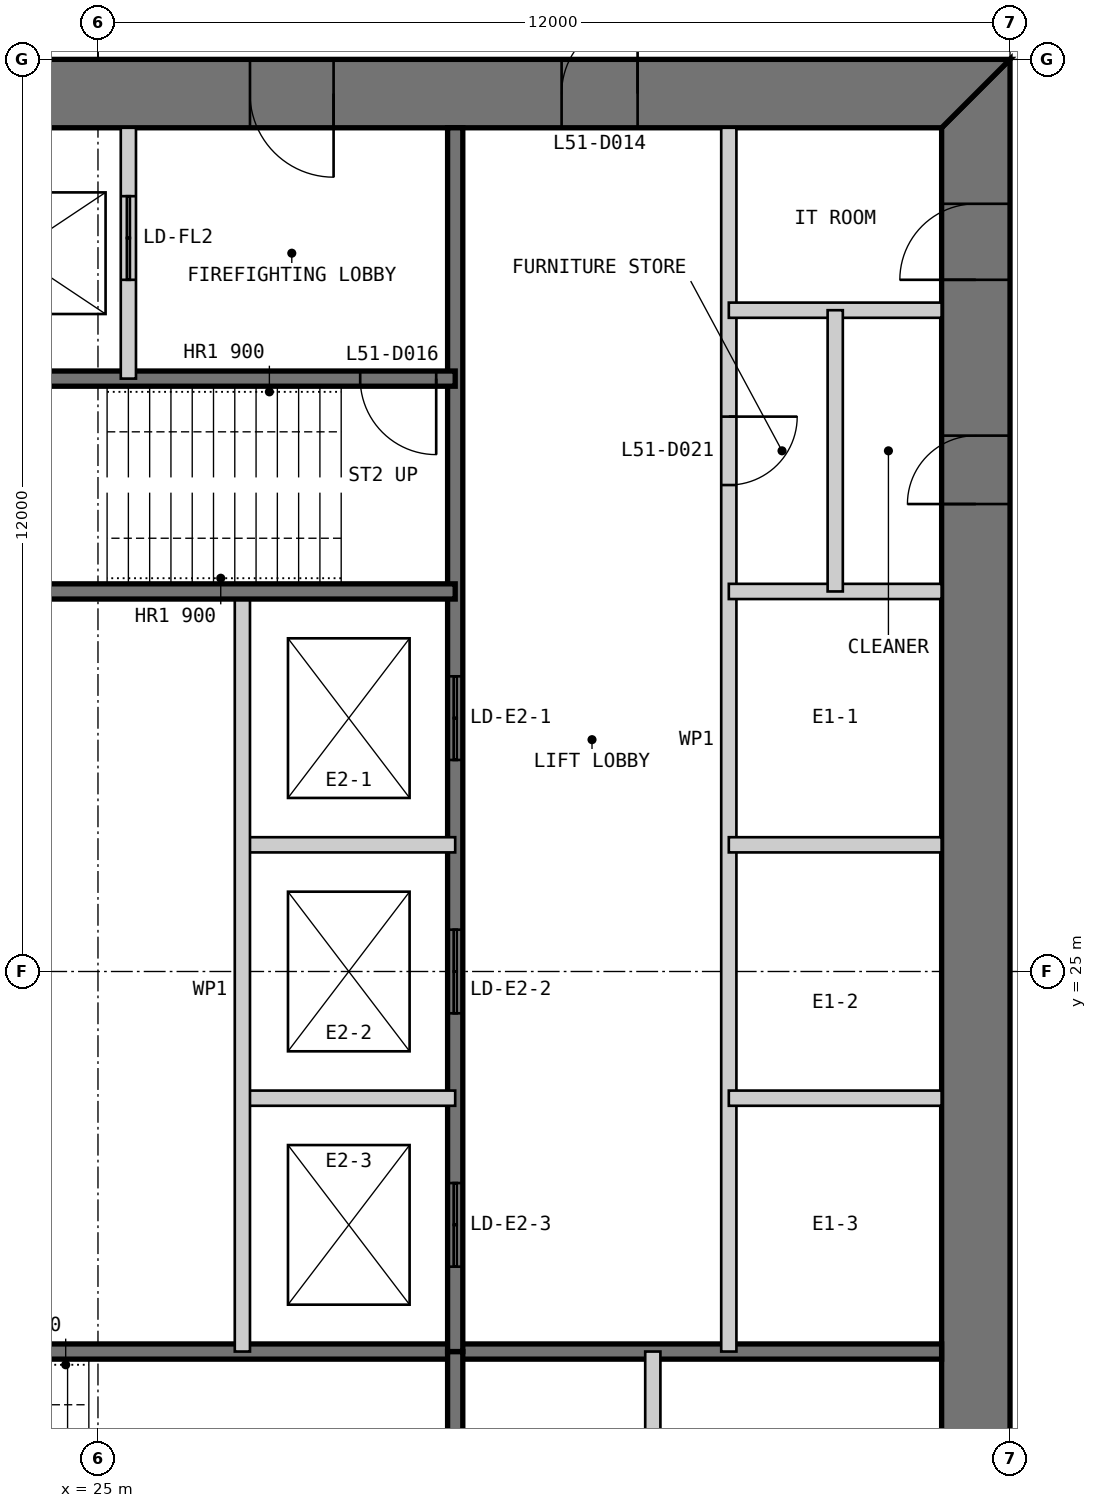
"""IFC4 building model, lengths in metres.
Left out: names, types, materials, properties, quantities, classifications, styles, units other than length and angle.
Written with IfcOpenShell. Run it as: python <this file> out.ifc"""

import sys

from ifc_helpers import new_model, si_unit, direction, frame, frame_2d, origin, place, context, subcontext, project, spatial, polyline, rectangle, outline, extrude, element, fill, save


model = new_model("IFC4")
c1 = context("Model", 3, precision=1e-05, world=origin(), true_north=direction((0.0, 1.0)))
c2 = subcontext(c1, "Body", "Model", "MODEL_VIEW")
j1 = project(units=[si_unit("LENGTHUNIT", "METRE"), si_unit("PLANEANGLEUNIT", "RADIAN")], contexts=[c1])
p1 = place(None, origin())
s1 = spatial("IfcSite", under=j1, at=p1, CompositionType="ELEMENT")
p2 = place(p1, origin())
s2 = spatial("IfcBuilding", under=s1, at=p2, CompositionType="ELEMENT")
p3 = place(p2, frame((0.0, 0.0, 217.8)))
s3 = spatial("IfcBuildingStorey", under=s2, at=p3, CompositionType="ELEMENT", Elevation=217.8)
p4 = place(p3, frame((36.55, 13.9, 0.0), z_axis=(0.0, 0.0, 1.0), x_axis=(0.0, 1.0, 0.0)))
e1 = element("IfcWall", 1, at=p4, inside=s3, PredefinedType="SHEAR", context=c2, shape_type="SweptSolid", body=[
    extrude(outline(polyline([(-0.9, -0.45), (23.1, -0.45), (22.2, 0.45), (0.0, 0.45), (-0.9, -0.45)])), origin(), (0.0, 0.0, 1.0), 4.0),
])
p5 = place(p4, frame((20.2, 0.0, 0.0)))
e2 = element("IfcOpeningElement", 2, at=p5, cuts=e1, PredefinedType="OPENING", context=c2, shape_type="SweptSolid", body=[
    extrude(rectangle(XDim=1.0, YDim=2.2, at=frame_2d((0.5, 1.1))), frame((0.0, 0.46, 0.0), z_axis=(0.0, -1.0, 0.0), x_axis=(1.0, 0.0, 0.0)), (0.0, 0.0, 1.0), 0.92),
])
p6 = place(p4, frame((17.25, 0.0, 0.0)))
e3 = element("IfcOpeningElement", 3, at=p6, cuts=e1, PredefinedType="OPENING", context=c2, shape_type="SweptSolid", body=[
    extrude(rectangle(XDim=0.9, YDim=2.2, at=frame_2d((0.45, 1.1))), frame((0.0, 0.46, 0.0), z_axis=(0.0, -1.0, 0.0), x_axis=(1.0, 0.0, 0.0)), (0.0, 0.0, 1.0), 0.92),
])
p7 = place(p3, frame((37.0, 36.55, 0.0), z_axis=(0.0, 0.0, 1.0), x_axis=(-1.0, 0.0, 0.0)))
e4 = element("IfcWall", 4, at=p7, inside=s3, PredefinedType="SHEAR", context=c2, shape_type="SweptSolid", body=[
    extrude(outline(polyline([(0.0, -0.45), (24.0, -0.45), (23.1, 0.45), (0.9, 0.45), (0.0, -0.45)])), origin(), (0.0, 0.0, 1.0), 4.0),
])
p8 = place(p7, frame((4.9, 0.0, 0.0)))
e5 = element("IfcOpeningElement", 5, at=p8, cuts=e4, PredefinedType="OPENING", context=c2, shape_type="SweptSolid", body=[
    extrude(rectangle(XDim=1.0, YDim=2.2, at=frame_2d((0.5, 1.1))), frame((0.0, 0.46, 0.0), z_axis=(0.0, -1.0, 0.0), x_axis=(1.0, 0.0, 0.0)), (0.0, 0.0, 1.0), 0.92),
])
p9 = place(p7, frame((8.9, 0.0, 0.0)))
e6 = element("IfcOpeningElement", 6, at=p9, cuts=e4, PredefinedType="OPENING", context=c2, shape_type="SweptSolid", body=[
    extrude(rectangle(XDim=1.1, YDim=2.2, at=frame_2d((0.55, 1.1))), frame((0.0, 0.46, 0.0), z_axis=(0.0, -1.0, 0.0), x_axis=(1.0, 0.0, 0.0)), (0.0, 0.0, 1.0), 0.92),
])
p10 = place(p7, frame((15.05, 0.0, 0.0)))
e7 = element("IfcOpeningElement", 7, at=p10, cuts=e4, PredefinedType="OPENING", context=c2, shape_type="SweptSolid", body=[
    extrude(rectangle(XDim=0.9, YDim=2.2, at=frame_2d((0.45, 1.1))), frame((0.0, 0.46, 0.0), z_axis=(0.0, -1.0, 0.0), x_axis=(1.0, 0.0, 0.0)), (0.0, 0.0, 1.0), 0.92),
])
p11 = place(p7, frame((17.9, 0.0, 0.0)))
e8 = element("IfcOpeningElement", 8, at=p11, cuts=e4, PredefinedType="OPENING", context=c2, shape_type="SweptSolid", body=[
    extrude(rectangle(XDim=1.0, YDim=2.2, at=frame_2d((0.5, 1.1))), frame((0.0, 0.46, 0.0), z_axis=(0.0, -1.0, 0.0), x_axis=(1.0, 0.0, 0.0)), (0.0, 0.0, 1.0), 0.92),
])
p12 = place(p7, frame((21.4, 0.0, 0.0)))
e9 = element("IfcOpeningElement", 9, at=p12, cuts=e4, PredefinedType="OPENING", context=c2, shape_type="SweptSolid", body=[
    extrude(rectangle(XDim=1.0, YDim=2.2, at=frame_2d((0.5, 1.1))), frame((0.0, 0.46, 0.0), z_axis=(0.0, -1.0, 0.0), x_axis=(1.0, 0.0, 0.0)), (0.0, 0.0, 1.0), 0.92),
])
p13 = place(p3, frame((20.3, 20.0, 0.0), z_axis=(0.0, 0.0, 1.0), x_axis=(1.0, 0.0, 0.0)))
e10 = element("IfcWall", 10, at=p13, inside=s3, PredefinedType="SOLIDWALL", context=c2, shape_type="SweptSolid", body=[
    extrude(rectangle(XDim=15.8, YDim=0.2, at=frame_2d((7.9, 0.0))), origin(), (0.0, 0.0, 1.0), 3.8),
])
p14 = place(p3, frame((29.7, 13.9, 0.0), z_axis=(0.0, 0.0, 1.0), x_axis=(0.0, 1.0, 0.0)))
e11 = element("IfcWall", 11, at=p14, inside=s3, PredefinedType="SOLIDWALL", context=c2, shape_type="SweptSolid", body=[
    extrude(rectangle(XDim=6.1, YDim=0.2, at=frame_2d((3.05, 0.0))), origin(), (0.0, 0.0, 1.0), 3.8),
])
p15 = place(p3, frame((32.3, 13.9, 0.0), z_axis=(0.0, 0.0, 1.0), x_axis=(0.0, 1.0, 0.0)))
e12 = element("IfcWall", 12, at=p15, inside=s3, PredefinedType="PARTITIONING", context=c2, shape_type="SweptSolid", body=[
    extrude(rectangle(XDim=6.1, YDim=0.2, at=frame_2d((3.05, 0.0))), origin(), (0.0, 0.0, 1.0), 3.8),
])
p16 = place(p3, frame((33.3, 36.1, 0.0), z_axis=(0.0, 0.0, 1.0), x_axis=(0.0, -1.0, 0.0)))
e13 = element("IfcWall", 13, at=p16, inside=s3, PredefinedType="PARTITIONING", context=c2, shape_type="SweptSolid", body=[
    extrude(rectangle(XDim=16.1, YDim=0.2, at=frame_2d((8.05, 0.0))), origin(), (0.0, 0.0, 1.0), 3.8),
])
p17 = place(p16, frame((3.8, 0.0, 0.0)))
e14 = element("IfcOpeningElement", 14, at=p17, cuts=e13, PredefinedType="OPENING", context=c2, shape_type="SweptSolid", body=[
    extrude(rectangle(XDim=0.9, YDim=2.2, at=frame_2d((0.45, 1.1))), frame((0.0, 0.11, 0.0), z_axis=(0.0, -1.0, 0.0), x_axis=(1.0, 0.0, 0.0)), (0.0, 0.0, 1.0), 0.22),
])
p18 = place(p3, frame((29.7, 36.1, 0.0), z_axis=(0.0, 0.0, 1.0), x_axis=(0.0, -1.0, 0.0)))
e15 = element("IfcWall", 15, at=p18, inside=s3, PredefinedType="SOLIDWALL", context=c2, shape_type="SweptSolid", body=[
    extrude(rectangle(XDim=16.1, YDim=0.2, at=frame_2d((8.05, 0.0))), origin(), (0.0, 0.0, 1.0), 3.8),
])
p19 = place(p18, frame((7.217, 0.0, 0.0)))
e16 = element("IfcOpeningElement", 16, at=p19, cuts=e15, PredefinedType="OPENING", context=c2, shape_type="SweptSolid", body=[
    extrude(rectangle(XDim=1.1, YDim=2.2, at=frame_2d((0.55, 1.1))), frame((0.0, 0.11, 0.0), z_axis=(0.0, -1.0, 0.0), x_axis=(1.0, 0.0, 0.0)), (0.0, 0.0, 1.0), 0.22),
])
p20 = place(p18, frame((10.55, 0.0, 0.0)))
e17 = element("IfcOpeningElement", 17, at=p20, cuts=e15, PredefinedType="OPENING", context=c2, shape_type="SweptSolid", body=[
    extrude(rectangle(XDim=1.1, YDim=2.2, at=frame_2d((0.55, 1.1))), frame((0.0, 0.11, 0.0), z_axis=(0.0, -1.0, 0.0), x_axis=(1.0, 0.0, 0.0)), (0.0, 0.0, 1.0), 0.22),
])
p21 = place(p18, frame((13.883, 0.0, 0.0)))
e18 = element("IfcOpeningElement", 18, at=p21, cuts=e15, PredefinedType="OPENING", context=c2, shape_type="SweptSolid", body=[
    extrude(rectangle(XDim=1.1, YDim=2.2, at=frame_2d((0.55, 1.1))), frame((0.0, 0.11, 0.0), z_axis=(0.0, -1.0, 0.0), x_axis=(1.0, 0.0, 0.0)), (0.0, 0.0, 1.0), 0.22),
])
for number, where, z_axis, x_axis in (
    (19, (36.1, 30.0, 0.0), (0.0, 0.0, 1.0), (-1.0, 0.0, 0.0)),
    (20, (36.1, 26.667, 0.0), (0.0, 0.0, 1.0), (-1.0, 0.0, 0.0)),
    (21, (36.1, 23.333, 0.0), (0.0, 0.0, 1.0), (-1.0, 0.0, 0.0)),
    (22, (29.7, 26.667, 0.0), (0.0, 0.0, 1.0), (-1.0, 0.0, 0.0)),
    (23, (29.7, 23.333, 0.0), (0.0, 0.0, 1.0), (-1.0, 0.0, 0.0)),
):
    element("IfcWall", number, at=place(p3, frame(where, z_axis=z_axis, x_axis=x_axis)), inside=s3, PredefinedType="PARTITIONING", context=c2, shape_type="SweptSolid", body=[
        extrude(rectangle(XDim=2.8, YDim=0.2, at=frame_2d((1.4, 0.0))), origin(), (0.0, 0.0, 1.0), 3.8),
    ])
p22 = place(p3, frame((26.9, 30.0, 0.0), z_axis=(0.0, 0.0, 1.0), x_axis=(0.0, -1.0, 0.0)))
e24 = element("IfcWall", 24, at=p22, inside=s3, PredefinedType="PARTITIONING", context=c2, shape_type="SweptSolid", body=[
    extrude(rectangle(XDim=10.0, YDim=0.2, at=frame_2d((5.0, 0.0))), origin(), (0.0, 0.0, 1.0), 3.8),
])
p23 = place(p3, frame((29.7, 32.8, 0.0), z_axis=(0.0, 0.0, 1.0), x_axis=(-1.0, 0.0, 0.0)))
e25 = element("IfcWall", 25, at=p23, inside=s3, PredefinedType="SOLIDWALL", context=c2, shape_type="SweptSolid", body=[
    extrude(rectangle(XDim=9.4, YDim=0.2, at=frame_2d((4.7, 0.0))), origin(), (0.0, 0.0, 1.0), 3.8),
])
p24 = place(p23, frame((0.25, 0.0, 0.0)))
e26 = element("IfcOpeningElement", 26, at=p24, cuts=e25, PredefinedType="OPENING", context=c2, shape_type="SweptSolid", body=[
    extrude(rectangle(XDim=1.0, YDim=2.2, at=frame_2d((0.5, 1.1))), frame((0.0, 0.11, 0.0), z_axis=(0.0, -1.0, 0.0), x_axis=(1.0, 0.0, 0.0)), (0.0, 0.0, 1.0), 0.22),
])
p25 = place(p3, frame((29.7, 30.0, 0.0), z_axis=(0.0, 0.0, 1.0), x_axis=(-1.0, 0.0, 0.0)))
e27 = element("IfcWall", 27, at=p25, inside=s3, PredefinedType="SOLIDWALL", context=c2, shape_type="SweptSolid", body=[
    extrude(rectangle(XDim=15.8, YDim=0.2, at=frame_2d((7.9, 0.0))), origin(), (0.0, 0.0, 1.0), 3.8),
])
p26 = place(p3, frame((25.4, 36.1, 0.0), z_axis=(0.0, 0.0, 1.0), x_axis=(0.0, -1.0, 0.0)))
e28 = element("IfcWall", 28, at=p26, inside=s3, PredefinedType="PARTITIONING", context=c2, shape_type="SweptSolid", body=[
    extrude(rectangle(XDim=3.3, YDim=0.2, at=frame_2d((1.65, 0.0))), origin(), (0.0, 0.0, 1.0), 3.8),
])
p27 = place(p26, frame((0.9, 0.0, 0.0)))
e29 = element("IfcOpeningElement", 29, at=p27, cuts=e28, PredefinedType="OPENING", context=c2, shape_type="SweptSolid", body=[
    extrude(rectangle(XDim=1.1, YDim=2.2, at=frame_2d((0.55, 1.1))), frame((0.0, 0.11, 0.0), z_axis=(0.0, -1.0, 0.0), x_axis=(1.0, 0.0, 0.0)), (0.0, 0.0, 1.0), 0.22),
])
p28 = place(p3, frame((36.1, 33.7, 0.0), z_axis=(0.0, 0.0, 1.0), x_axis=(-1.0, 0.0, 0.0)))
e30 = element("IfcWall", 30, at=p28, inside=s3, PredefinedType="PARTITIONING", context=c2, shape_type="SweptSolid", body=[
    extrude(rectangle(XDim=2.8, YDim=0.2, at=frame_2d((1.4, 0.0))), origin(), (0.0, 0.0, 1.0), 3.8),
])
p29 = place(p3, frame((34.7, 33.7, 0.0), z_axis=(0.0, 0.0, 1.0), x_axis=(0.0, -1.0, 0.0)))
e31 = element("IfcWall", 31, at=p29, inside=s3, PredefinedType="PARTITIONING", context=c2, shape_type="SweptSolid", body=[
    extrude(rectangle(XDim=3.7, YDim=0.2, at=frame_2d((1.85, 0.0))), origin(), (0.0, 0.0, 1.0), 3.8),
])
p30 = place(p8, frame((1.0, 0.0, 0.0), z_axis=(0.0, 0.0, 1.0), x_axis=(-1.0, 0.0, 0.0)))
e32 = element("IfcDoor", 32, at=p30, inside=s3, OperationType="SINGLE_SWING_RIGHT", PredefinedType="DOOR", context=c2, shape_type="SweptSolid", body=[
    extrude(rectangle(XDim=1.0, YDim=2.2, at=frame_2d((0.5, 1.1))), frame((0.0, 0.025, 0.0), z_axis=(0.0, -1.0, 0.0), x_axis=(1.0, 0.0, 0.0)), (0.0, 0.0, 1.0), 0.05),
    extrude(outline(polyline([(0.0, 0.0), (0.04, 0.0), (0.04, 2.16), (0.96, 2.16), (0.96, 0.0), (1.0, 0.0), (1.0, 2.2), (0.0, 2.2), (0.0, 0.0)])), frame((0.0, 0.3, 0.0), z_axis=(0.0, -1.0, 0.0), x_axis=(1.0, 0.0, 0.0)), (0.0, 0.0, 1.0), 0.6),
])
fill(e5, e32)
p31 = place(p9, origin())
e33 = element("IfcDoor", 33, at=p31, inside=s3, OperationType="SINGLE_SWING_LEFT", PredefinedType="DOOR", context=c2, shape_type="SweptSolid", body=[
    extrude(rectangle(XDim=1.1, YDim=2.2, at=frame_2d((0.55, 1.1))), frame((0.0, 0.025, 0.0), z_axis=(0.0, -1.0, 0.0), x_axis=(1.0, 0.0, 0.0)), (0.0, 0.0, 1.0), 0.05),
    extrude(outline(polyline([(0.0, 0.0), (0.04, 0.0), (0.04, 2.16), (1.06, 2.16), (1.06, 0.0), (1.1, 0.0), (1.1, 2.2), (0.0, 2.2), (0.0, 0.0)])), frame((0.0, 0.3, 0.0), z_axis=(0.0, -1.0, 0.0), x_axis=(1.0, 0.0, 0.0)), (0.0, 0.0, 1.0), 0.6),
])
fill(e6, e33)
p32 = place(p24, origin())
e34 = element("IfcDoor", 34, at=p32, inside=s3, OperationType="SINGLE_SWING_LEFT", PredefinedType="DOOR", context=c2, shape_type="SweptSolid", body=[
    extrude(rectangle(XDim=1.0, YDim=2.2, at=frame_2d((0.5, 1.1))), frame((0.0, 0.025, 0.0), z_axis=(0.0, -1.0, 0.0), x_axis=(1.0, 0.0, 0.0)), (0.0, 0.0, 1.0), 0.05),
])
fill(e26, e34)
p33 = place(p5, origin())
e35 = element("IfcDoor", 35, at=p33, inside=s3, OperationType="SINGLE_SWING_LEFT", PredefinedType="DOOR", context=c2, shape_type="SweptSolid", body=[
    extrude(rectangle(XDim=1.0, YDim=2.2, at=frame_2d((0.5, 1.1))), frame((0.0, 0.025, 0.0), z_axis=(0.0, -1.0, 0.0), x_axis=(1.0, 0.0, 0.0)), (0.0, 0.0, 1.0), 0.05),
    extrude(outline(polyline([(0.0, 0.0), (0.04, 0.0), (0.04, 2.16), (0.96, 2.16), (0.96, 0.0), (1.0, 0.0), (1.0, 2.2), (0.0, 2.2), (0.0, 0.0)])), frame((0.0, 0.3, 0.0), z_axis=(0.0, -1.0, 0.0), x_axis=(1.0, 0.0, 0.0)), (0.0, 0.0, 1.0), 0.6),
])
fill(e2, e35)
p34 = place(p17, origin())
e36 = element("IfcDoor", 36, at=p34, inside=s3, OperationType="SINGLE_SWING_LEFT", PredefinedType="DOOR", context=c2, shape_type="SweptSolid", body=[
    extrude(rectangle(XDim=0.9, YDim=2.2, at=frame_2d((0.45, 1.1))), frame((0.0, 0.025, 0.0), z_axis=(0.0, -1.0, 0.0), x_axis=(1.0, 0.0, 0.0)), (0.0, 0.0, 1.0), 0.05),
])
fill(e14, e36)
p35 = place(p6, origin())
e37 = element("IfcDoor", 37, at=p35, inside=s3, OperationType="SINGLE_SWING_LEFT", PredefinedType="DOOR", context=c2, shape_type="SweptSolid", body=[
    extrude(rectangle(XDim=0.9, YDim=2.2, at=frame_2d((0.45, 1.1))), frame((0.0, 0.025, 0.0), z_axis=(0.0, -1.0, 0.0), x_axis=(1.0, 0.0, 0.0)), (0.0, 0.0, 1.0), 0.05),
    extrude(outline(polyline([(0.0, 0.0), (0.04, 0.0), (0.04, 2.16), (0.86, 2.16), (0.86, 0.0), (0.9, 0.0), (0.9, 2.2), (0.0, 2.2), (0.0, 0.0)])), frame((0.0, 0.3, 0.0), z_axis=(0.0, -1.0, 0.0), x_axis=(1.0, 0.0, 0.0)), (0.0, 0.0, 1.0), 0.6),
])
fill(e3, e37)
p36 = place(p27, origin())
e38 = element("IfcDoor", 38, at=p36, inside=s3, OperationType="DOUBLE_DOOR_SLIDING", PredefinedType="DOOR", context=c2, shape_type="SweptSolid", body=[
    extrude(rectangle(XDim=1.1, YDim=2.2, at=frame_2d((0.55, 1.1))), frame((0.0, 0.025, 0.0), z_axis=(0.0, -1.0, 0.0), x_axis=(1.0, 0.0, 0.0)), (0.0, 0.0, 1.0), 0.05),
])
fill(e29, e38)
p37 = place(p19, origin())
e39 = element("IfcDoor", 39, at=p37, inside=s3, OperationType="DOUBLE_DOOR_SLIDING", PredefinedType="DOOR", context=c2, shape_type="SweptSolid", body=[
    extrude(rectangle(XDim=1.1, YDim=2.2, at=frame_2d((0.55, 1.1))), frame((0.0, 0.025, 0.0), z_axis=(0.0, -1.0, 0.0), x_axis=(1.0, 0.0, 0.0)), (0.0, 0.0, 1.0), 0.05),
])
fill(e16, e39)
p38 = place(p20, origin())
e40 = element("IfcDoor", 40, at=p38, inside=s3, OperationType="DOUBLE_DOOR_SLIDING", PredefinedType="DOOR", context=c2, shape_type="SweptSolid", body=[
    extrude(rectangle(XDim=1.1, YDim=2.2, at=frame_2d((0.55, 1.1))), frame((0.0, 0.025, 0.0), z_axis=(0.0, -1.0, 0.0), x_axis=(1.0, 0.0, 0.0)), (0.0, 0.0, 1.0), 0.05),
])
fill(e17, e40)
p39 = place(p21, origin())
e41 = element("IfcDoor", 41, at=p39, inside=s3, OperationType="DOUBLE_DOOR_SLIDING", PredefinedType="DOOR", context=c2, shape_type="SweptSolid", body=[
    extrude(rectangle(XDim=1.1, YDim=2.2, at=frame_2d((0.55, 1.1))), frame((0.0, 0.025, 0.0), z_axis=(0.0, -1.0, 0.0), x_axis=(1.0, 0.0, 0.0)), (0.0, 0.0, 1.0), 0.05),
])
fill(e18, e41)
save(model, sys.argv[1])
